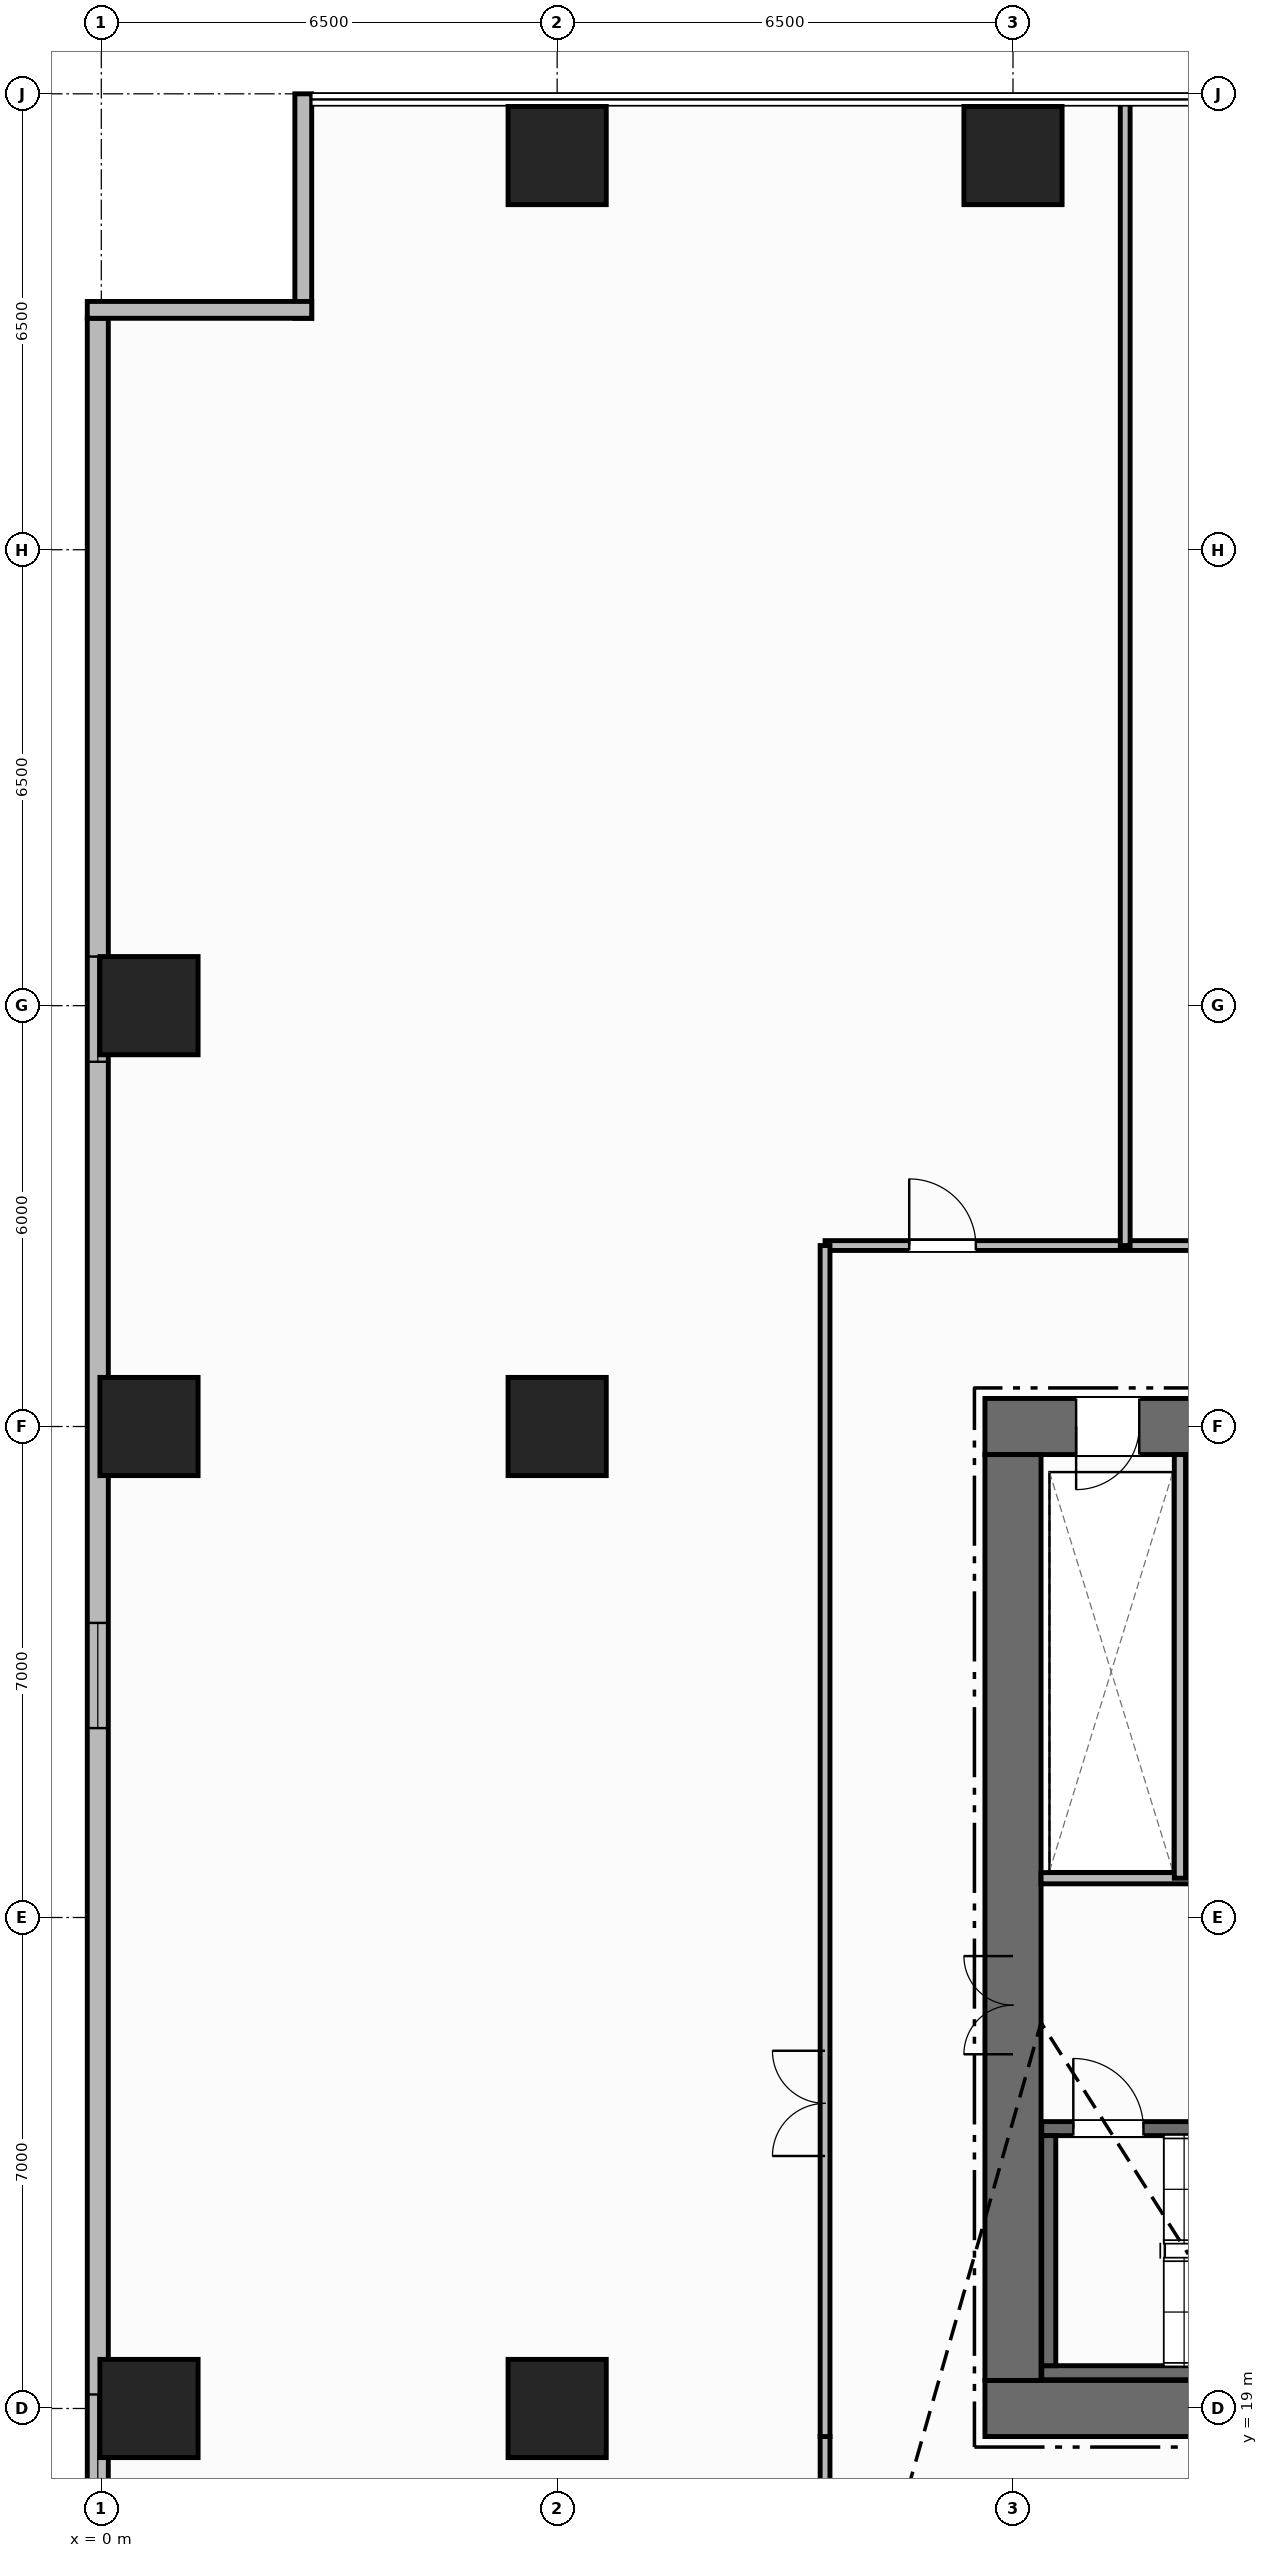
"""IFC4 building model, lengths in metres.
Left out: names, types, materials, properties, quantities, classifications, styles, units other than length and angle.
Written with IfcOpenShell. Run it as: python <this file> out.ifc"""

import sys

from ifc_helpers import new_model, si_unit, direction, frame, frame_2d, origin, origin_2d, place, context, subcontext, project, spatial, rectangle, extrude, element, fill, save


model = new_model("IFC4")
c1 = context("Model", 3, precision=1e-05, world=origin(), true_north=direction((0.0, 1.0)))
c2 = subcontext(c1, "Body", "Model", "MODEL_VIEW")
j1 = project(units=[si_unit("LENGTHUNIT", "METRE"), si_unit("PLANEANGLEUNIT", "RADIAN")], contexts=[c1])
p1 = place(None, origin())
s1 = spatial("IfcSite", under=j1, at=p1, CompositionType="ELEMENT")
p2 = place(p1, origin())
s2 = spatial("IfcBuilding", under=s1, at=p2, CompositionType="ELEMENT")
p3 = place(p2, frame((0.0, 0.0, 11.5)))
s3 = spatial("IfcBuildingStorey", under=s2, at=p3, CompositionType="ELEMENT", Elevation=11.5)
p4 = place(p3, frame((12.6, 19.0, 0.0), z_axis=(0.0, 0.0, 1.0), x_axis=(1.0, 0.0, 0.0)))
e1 = element("IfcWall", 1, at=p4, inside=s3, PredefinedType="SHEAR", context=c2, shape_type="SweptSolid", body=[
    extrude(rectangle(XDim=13.8, YDim=0.8, at=frame_2d((6.9, 0.0))), origin(), (0.0, 0.0, 1.0), 5.5),
])
p5 = place(p4, frame((9.28, 0.0, 0.0)))
e2 = element("IfcOpeningElement", 2, at=p5, cuts=e1, PredefinedType="OPENING", context=c2, shape_type="SweptSolid", body=[
    extrude(rectangle(XDim=1.4, YDim=2.2, at=frame_2d((0.7, 1.1))), frame((0.0, 0.41, 0.0), z_axis=(0.0, -1.0, 0.0), x_axis=(1.0, 0.0, 0.0)), (0.0, 0.0, 1.0), 0.82),
])
p6 = place(p3, frame((12.6, 33.0, 0.0), z_axis=(0.0, 0.0, 1.0), x_axis=(1.0, 0.0, 0.0)))
e3 = element("IfcWall", 3, at=p6, inside=s3, PredefinedType="SHEAR", context=c2, shape_type="SweptSolid", body=[
    extrude(rectangle(XDim=13.8, YDim=0.8, at=frame_2d((6.9, 0.0))), origin(), (0.0, 0.0, 1.0), 5.5),
])
p7 = place(p6, frame((1.3, 0.0, 0.0)))
e4 = element("IfcOpeningElement", 4, at=p7, cuts=e3, PredefinedType="OPENING", context=c2, shape_type="SweptSolid", body=[
    extrude(rectangle(XDim=0.9, YDim=2.15, at=frame_2d((0.45, 1.075))), frame((0.0, 0.41, 0.0), z_axis=(0.0, -1.0, 0.0), x_axis=(1.0, 0.0, 0.0)), (0.0, 0.0, 1.0), 0.82),
])
p8 = place(p6, frame((3.2, 0.0, 0.0)))
e5 = element("IfcOpeningElement", 5, at=p8, cuts=e3, PredefinedType="OPENING", context=c2, shape_type="SweptSolid", body=[
    extrude(rectangle(XDim=0.9, YDim=2.15, at=frame_2d((0.45, 1.075))), frame((0.0, 0.41, 0.0), z_axis=(0.0, -1.0, 0.0), x_axis=(1.0, 0.0, 0.0)), (0.0, 0.0, 1.0), 0.82),
])
p9 = place(p6, frame((5.0, 0.0, 0.0)))
e6 = element("IfcOpeningElement", 6, at=p9, cuts=e3, PredefinedType="OPENING", context=c2, shape_type="SweptSolid", body=[
    extrude(rectangle(XDim=0.9, YDim=2.15, at=frame_2d((0.45, 1.075))), frame((0.0, 0.41, 0.0), z_axis=(0.0, -1.0, 0.0), x_axis=(1.0, 0.0, 0.0)), (0.0, 0.0, 1.0), 0.82),
])
p10 = place(p6, frame((6.9, 0.0, 0.0)))
e7 = element("IfcOpeningElement", 7, at=p10, cuts=e3, PredefinedType="OPENING", context=c2, shape_type="SweptSolid", body=[
    extrude(rectangle(XDim=0.9, YDim=2.15, at=frame_2d((0.45, 1.075))), frame((0.0, 0.41, 0.0), z_axis=(0.0, -1.0, 0.0), x_axis=(1.0, 0.0, 0.0)), (0.0, 0.0, 1.0), 0.82),
])
p11 = place(p6, frame((9.28, 0.0, 0.0)))
e8 = element("IfcOpeningElement", 8, at=p11, cuts=e3, PredefinedType="OPENING", context=c2, shape_type="SweptSolid", body=[
    extrude(rectangle(XDim=1.4, YDim=2.2, at=frame_2d((0.7, 1.1))), frame((0.0, 0.41, 0.0), z_axis=(0.0, -1.0, 0.0), x_axis=(1.0, 0.0, 0.0)), (0.0, 0.0, 1.0), 0.82),
])
p12 = place(p3, frame((13.0, 19.4, 0.0), z_axis=(0.0, 0.0, 1.0), x_axis=(0.0, 1.0, 0.0)))
e9 = element("IfcWall", 9, at=p12, inside=s3, PredefinedType="SHEAR", context=c2, shape_type="SweptSolid", body=[
    extrude(rectangle(XDim=13.2, YDim=0.8, at=frame_2d((6.6, 0.0))), origin(), (0.0, 0.0, 1.0), 5.5),
])
p13 = place(p12, frame((4.65, 0.0, 0.0)))
e10 = element("IfcOpeningElement", 10, at=p13, cuts=e9, PredefinedType="OPENING", context=c2, shape_type="SweptSolid", body=[
    extrude(rectangle(XDim=1.4, YDim=2.2, at=frame_2d((0.7, 1.1))), frame((0.0, 0.41, 0.0), z_axis=(0.0, -1.0, 0.0), x_axis=(1.0, 0.0, 0.0)), (0.0, 0.0, 1.0), 0.82),
])
p14 = place(p3, frame((13.41, 19.51, 0.0), z_axis=(0.0, 0.0, 1.0), x_axis=(1.0, 0.0, 0.0)))
e11 = element("IfcWall", 11, at=p14, inside=s3, PredefinedType="SHEAR", context=c2, shape_type="SweptSolid", body=[
    extrude(rectangle(XDim=8.43, YDim=0.2, at=frame_2d((4.215, 0.0))), origin(), (0.0, 0.0, 1.0), 5.5),
])
p15 = place(p3, frame((13.41, 22.99, 0.0), z_axis=(0.0, 0.0, 1.0), x_axis=(1.0, 0.0, 0.0)))
e12 = element("IfcWall", 12, at=p15, inside=s3, PredefinedType="SHEAR", context=c2, shape_type="SweptSolid", body=[
    extrude(rectangle(XDim=8.43, YDim=0.2, at=frame_2d((4.215, 0.0))), origin(), (0.0, 0.0, 1.0), 5.5),
])
p16 = place(p15, frame((0.45, 0.0, 0.0)))
e13 = element("IfcOpeningElement", 13, at=p16, cuts=e12, PredefinedType="OPENING", context=c2, shape_type="SweptSolid", body=[
    extrude(rectangle(XDim=1.0, YDim=2.15, at=frame_2d((0.5, 1.075))), frame((0.0, 0.11, 0.0), z_axis=(0.0, -1.0, 0.0), x_axis=(1.0, 0.0, 0.0)), (0.0, 0.0, 1.0), 0.22),
])
p17 = place(p3, frame((13.51, 19.61, 0.0), z_axis=(0.0, 0.0, 1.0), x_axis=(0.0, 1.0, 0.0)))
e14 = element("IfcWall", 14, at=p17, inside=s3, PredefinedType="SHEAR", context=c2, shape_type="SweptSolid", body=[
    extrude(rectangle(XDim=3.28, YDim=0.2, at=frame_2d((1.64, 0.0))), origin(), (0.0, 0.0, 1.0), 5.5),
])
for number, where, z_axis, x_axis in (
    (15, (6.5, 19.0, 0.0), (0.0, 0.0, 1.0), (1.0, 0.0, 0.0)),
    (16, (6.5, 33.0, 0.0), (0.0, 0.0, 1.0), (1.0, 0.0, 0.0)),
    (17, (6.5, 51.12, 0.0), (0.0, 0.0, 1.0), (1.0, 0.0, 0.0)),
    (18, (13.0, 51.12, 0.0), (0.0, 0.0, 1.0), (1.0, 0.0, 0.0)),
    (19, (0.68, 19.0, 0.0), (0.0, 0.0, 1.0), (1.0, 0.0, 0.0)),
    (20, (0.68, 33.0, 0.0), (0.0, 0.0, 1.0), (1.0, 0.0, 0.0)),
    (21, (0.68, 39.0, 0.0), (0.0, 0.0, 1.0), (1.0, 0.0, 0.0)),
):
    element("IfcColumn", number, at=place(p3, frame(where, z_axis=z_axis, x_axis=x_axis)), inside=s3, PredefinedType="COLUMN", context=c2, shape_type="SweptSolid", body=[
        extrude(rectangle(XDim=1.4, YDim=1.4, at=origin_2d()), origin(), (0.0, 0.0, 1.0), 5.5),
    ])
p18 = place(p3, frame((-0.05, 3.2, 0.0), z_axis=(0.0, 0.0, 1.0), x_axis=(0.0, 1.0, 0.0)))
e22 = element("IfcWall", 22, at=p18, inside=s3, PredefinedType="STANDARD", context=c2, shape_type="SweptSolid", body=[
    extrude(rectangle(XDim=45.6, YDim=0.3, at=frame_2d((22.8, 0.0))), origin(), (0.0, 0.0, 1.0), 5.22),
])
p19 = place(p18, frame((5.0, 0.0, 0.9)))
e23 = element("IfcOpeningElement", 23, at=p19, cuts=e22, PredefinedType="OPENING", context=c2, shape_type="SweptSolid", body=[
    extrude(rectangle(XDim=1.5, YDim=2.2, at=frame_2d((0.75, 1.1))), frame((0.0, 0.16, 0.0), z_axis=(0.0, -1.0, 0.0), x_axis=(1.0, 0.0, 0.0)), (0.0, 0.0, 1.0), 0.32),
])
p20 = place(p18, frame((14.5, 0.0, 0.9)))
e24 = element("IfcOpeningElement", 24, at=p20, cuts=e22, PredefinedType="OPENING", context=c2, shape_type="SweptSolid", body=[
    extrude(rectangle(XDim=1.5, YDim=2.2, at=frame_2d((0.75, 1.1))), frame((0.0, 0.16, 0.0), z_axis=(0.0, -1.0, 0.0), x_axis=(1.0, 0.0, 0.0)), (0.0, 0.0, 1.0), 0.32),
])
p21 = place(p18, frame((25.5, 0.0, 0.9)))
e25 = element("IfcOpeningElement", 25, at=p21, cuts=e22, PredefinedType="OPENING", context=c2, shape_type="SweptSolid", body=[
    extrude(rectangle(XDim=1.5, YDim=2.2, at=frame_2d((0.75, 1.1))), frame((0.0, 0.16, 0.0), z_axis=(0.0, -1.0, 0.0), x_axis=(1.0, 0.0, 0.0)), (0.0, 0.0, 1.0), 0.32),
])
p22 = place(p18, frame((35.0, 0.0, 0.9)))
e26 = element("IfcOpeningElement", 26, at=p22, cuts=e22, PredefinedType="OPENING", context=c2, shape_type="SweptSolid", body=[
    extrude(rectangle(XDim=1.5, YDim=2.2, at=frame_2d((0.75, 1.1))), frame((0.0, 0.16, 0.0), z_axis=(0.0, -1.0, 0.0), x_axis=(1.0, 0.0, 0.0)), (0.0, 0.0, 1.0), 0.32),
])
for number, where, z_axis, x_axis in (
    (27, (2.88, 48.8, 0.0), (0.0, 0.0, 1.0), (0.0, 1.0, 0.0)),
    (28, (-0.2, 48.92, 0.0), (0.0, 0.0, 1.0), (1.0, 0.0, 0.0)),
):
    element("IfcWall", number, at=place(p3, frame(where, z_axis=z_axis, x_axis=x_axis)), inside=s3, PredefinedType="STANDARD", context=c2, shape_type="SweptSolid", body=[
        extrude(rectangle(XDim=3.2, YDim=0.24, at=frame_2d((1.6, 0.0))), origin(), (0.0, 0.0, 1.0), 5.22),
    ])
p23 = place(p3, frame((13.4, 26.56, 0.0), z_axis=(0.0, 0.0, 1.0), x_axis=(1.0, 0.0, 0.0)))
e29 = element("IfcWall", 29, at=p23, inside=s3, PredefinedType="STANDARD", context=c2, shape_type="SweptSolid", body=[
    extrude(rectangle(XDim=8.34, YDim=0.16, at=frame_2d((4.17, 0.0))), origin(), (0.0, 0.0, 1.0), 5.22),
])
p24 = place(p3, frame((15.38, 26.56, 0.0), z_axis=(0.0, 0.0, 1.0), x_axis=(0.0, 1.0, 0.0)))
e30 = element("IfcWall", 30, at=p24, inside=s3, PredefinedType="STANDARD", context=c2, shape_type="SweptSolid", body=[
    extrude(rectangle(XDim=6.04, YDim=0.16, at=frame_2d((3.02, 0.0))), origin(), (0.0, 0.0, 1.0), 5.22),
])
p25 = place(p3, frame((10.32, 35.58, 0.0), z_axis=(0.0, 0.0, 1.0), x_axis=(1.0, 0.0, 0.0)))
e31 = element("IfcWall", 31, at=p25, inside=s3, PredefinedType="PARTITIONING", context=c2, shape_type="SweptSolid", body=[
    extrude(rectangle(XDim=15.6, YDim=0.14, at=frame_2d((7.8, 0.0))), origin(), (0.0, 0.0, 1.0), 5.22),
])
p26 = place(p25, frame((10.78, 0.0, 0.0)))
e32 = element("IfcOpeningElement", 32, at=p26, cuts=e31, PredefinedType="OPENING", context=c2, shape_type="SweptSolid", body=[
    extrude(rectangle(XDim=0.9, YDim=2.15, at=frame_2d((0.45, 1.075))), frame((0.0, 0.08, 0.0), z_axis=(0.0, -1.0, 0.0), x_axis=(1.0, 0.0, 0.0)), (0.0, 0.0, 1.0), 0.16),
])
p27 = place(p25, frame((13.63, 0.0, 0.0)))
e33 = element("IfcOpeningElement", 33, at=p27, cuts=e31, PredefinedType="OPENING", context=c2, shape_type="SweptSolid", body=[
    extrude(rectangle(XDim=0.9, YDim=2.15, at=frame_2d((0.45, 1.075))), frame((0.0, 0.08, 0.0), z_axis=(0.0, -1.0, 0.0), x_axis=(1.0, 0.0, 0.0)), (0.0, 0.0, 1.0), 0.16),
])
p28 = place(p25, frame((1.2, 0.0, 0.0)))
e34 = element("IfcOpeningElement", 34, at=p28, cuts=e31, PredefinedType="OPENING", context=c2, shape_type="SweptSolid", body=[
    extrude(rectangle(XDim=0.95, YDim=2.15, at=frame_2d((0.475, 1.075))), frame((0.0, 0.08, 0.0), z_axis=(0.0, -1.0, 0.0), x_axis=(1.0, 0.0, 0.0)), (0.0, 0.0, 1.0), 0.16),
])
p29 = place(p25, frame((5.8, 0.0, 0.0)))
e35 = element("IfcOpeningElement", 35, at=p29, cuts=e31, PredefinedType="OPENING", context=c2, shape_type="SweptSolid", body=[
    extrude(rectangle(XDim=0.95, YDim=2.15, at=frame_2d((0.475, 1.075))), frame((0.0, 0.08, 0.0), z_axis=(0.0, -1.0, 0.0), x_axis=(1.0, 0.0, 0.0)), (0.0, 0.0, 1.0), 0.16),
])
p30 = place(p3, frame((10.32, 16.42, 0.0), z_axis=(0.0, 0.0, 1.0), x_axis=(0.0, 1.0, 0.0)))
e36 = element("IfcWall", 36, at=p30, inside=s3, PredefinedType="PARTITIONING", context=c2, shape_type="SweptSolid", body=[
    extrude(rectangle(XDim=2.18, YDim=0.14, at=frame_2d((1.09, 0.0))), origin(), (0.0, 0.0, 1.0), 5.22),
])
p31 = place(p3, frame((14.6, 35.58, 0.0), z_axis=(0.0, 0.0, 1.0), x_axis=(0.0, 1.0, 0.0)))
e37 = element("IfcWall", 37, at=p31, inside=s3, PredefinedType="PARTITIONING", context=c2, shape_type="SweptSolid", body=[
    extrude(rectangle(XDim=16.36, YDim=0.14, at=frame_2d((8.18, 0.0))), origin(), (0.0, 0.0, 1.0), 5.22),
])
p32 = place(p3, frame((10.32, 18.6, 0.0), z_axis=(0.0, 0.0, 1.0), x_axis=(0.0, 1.0, 0.0)))
e38 = element("IfcWall", 38, at=p32, inside=s3, PredefinedType="PARTITIONING", context=c2, shape_type="SweptSolid", body=[
    extrude(rectangle(XDim=16.98, YDim=0.14, at=frame_2d((8.49, 0.0))), origin(), (0.0, 0.0, 1.0), 5.22),
])
p33 = place(p32, frame((4.0, 0.0, 0.0)))
e39 = element("IfcOpeningElement", 39, at=p33, cuts=e38, PredefinedType="OPENING", context=c2, shape_type="SweptSolid", body=[
    extrude(rectangle(XDim=1.5, YDim=2.2, at=frame_2d((0.75, 1.1))), frame((0.0, 0.08, 0.0), z_axis=(0.0, -1.0, 0.0), x_axis=(1.0, 0.0, 0.0)), (0.0, 0.0, 1.0), 0.16),
])
p34 = place(p20, origin())
e40 = element("IfcWindow", 40, at=p34, inside=s3, PartitioningType="SINGLE_PANEL", PredefinedType="WINDOW", context=c2, shape_type="SweptSolid", body=[
    extrude(rectangle(XDim=1.5, YDim=2.2, at=frame_2d((0.75, 1.1))), frame((0.0, 0.03, 0.0), z_axis=(0.0, -1.0, 0.0), x_axis=(1.0, 0.0, 0.0)), (0.0, 0.0, 1.0), 0.06),
])
fill(e24, e40)
p35 = place(p21, origin())
e41 = element("IfcWindow", 41, at=p35, inside=s3, PartitioningType="SINGLE_PANEL", PredefinedType="WINDOW", context=c2, shape_type="SweptSolid", body=[
    extrude(rectangle(XDim=1.5, YDim=2.2, at=frame_2d((0.75, 1.1))), frame((0.0, 0.03, 0.0), z_axis=(0.0, -1.0, 0.0), x_axis=(1.0, 0.0, 0.0)), (0.0, 0.0, 1.0), 0.06),
])
fill(e25, e41)
p36 = place(p22, origin())
e42 = element("IfcWindow", 42, at=p36, inside=s3, PartitioningType="SINGLE_PANEL", PredefinedType="WINDOW", context=c2, shape_type="SweptSolid", body=[
    extrude(rectangle(XDim=1.5, YDim=2.2, at=frame_2d((0.75, 1.1))), frame((0.0, 0.03, 0.0), z_axis=(0.0, -1.0, 0.0), x_axis=(1.0, 0.0, 0.0)), (0.0, 0.0, 1.0), 0.06),
])
fill(e26, e42)
p37 = place(p16, origin())
e43 = element("IfcDoor", 43, at=p37, inside=s3, OperationType="SINGLE_SWING_LEFT", PredefinedType="DOOR", context=c2, shape_type="SweptSolid", body=[
    extrude(rectangle(XDim=1.0, YDim=2.15, at=frame_2d((0.5, 1.075))), frame((0.0, 0.025, 0.0), z_axis=(0.0, -1.0, 0.0), x_axis=(1.0, 0.0, 0.0)), (0.0, 0.0, 1.0), 0.05),
])
fill(e13, e43)
p38 = place(p13, origin())
e44 = element("IfcDoor", 44, at=p38, inside=s3, OperationType="DOUBLE_DOOR_SINGLE_SWING", PredefinedType="DOOR", context=c2, shape_type="SweptSolid", body=[
    extrude(rectangle(XDim=1.4, YDim=2.2, at=frame_2d((0.7, 1.1))), frame((0.0, 0.025, 0.0), z_axis=(0.0, -1.0, 0.0), x_axis=(1.0, 0.0, 0.0)), (0.0, 0.0, 1.0), 0.05),
])
fill(e10, e44)
p39 = place(p7, origin())
e45 = element("IfcDoor", 45, at=p39, inside=s3, OperationType="SINGLE_SWING_RIGHT", PredefinedType="DOOR", context=c2, shape_type="SweptSolid", body=[
    extrude(rectangle(XDim=0.9, YDim=2.15, at=frame_2d((0.45, 1.075))), frame((0.0, -0.075, 0.0), z_axis=(0.0, -1.0, 0.0), x_axis=(1.0, 0.0, 0.0)), (0.0, 0.0, 1.0), 0.05),
])
fill(e4, e45)
p40 = place(p28, origin())
e46 = element("IfcDoor", 46, at=p40, inside=s3, OperationType="SINGLE_SWING_LEFT", PredefinedType="DOOR", context=c2, shape_type="SweptSolid", body=[
    extrude(rectangle(XDim=0.95, YDim=2.15, at=frame_2d((0.475, 1.075))), frame((0.0, 0.025, 0.0), z_axis=(0.0, -1.0, 0.0), x_axis=(1.0, 0.0, 0.0)), (0.0, 0.0, 1.0), 0.05),
])
fill(e34, e46)
p41 = place(p33, origin())
e47 = element("IfcDoor", 47, at=p41, inside=s3, OperationType="DOUBLE_DOOR_SINGLE_SWING", PredefinedType="DOOR", context=c2, shape_type="SweptSolid", body=[
    extrude(rectangle(XDim=1.5, YDim=2.2, at=frame_2d((0.75, 1.1))), frame((0.0, 0.025, 0.0), z_axis=(0.0, -1.0, 0.0), x_axis=(1.0, 0.0, 0.0)), (0.0, 0.0, 1.0), 0.05),
])
fill(e39, e47)
save(model, sys.argv[1])
